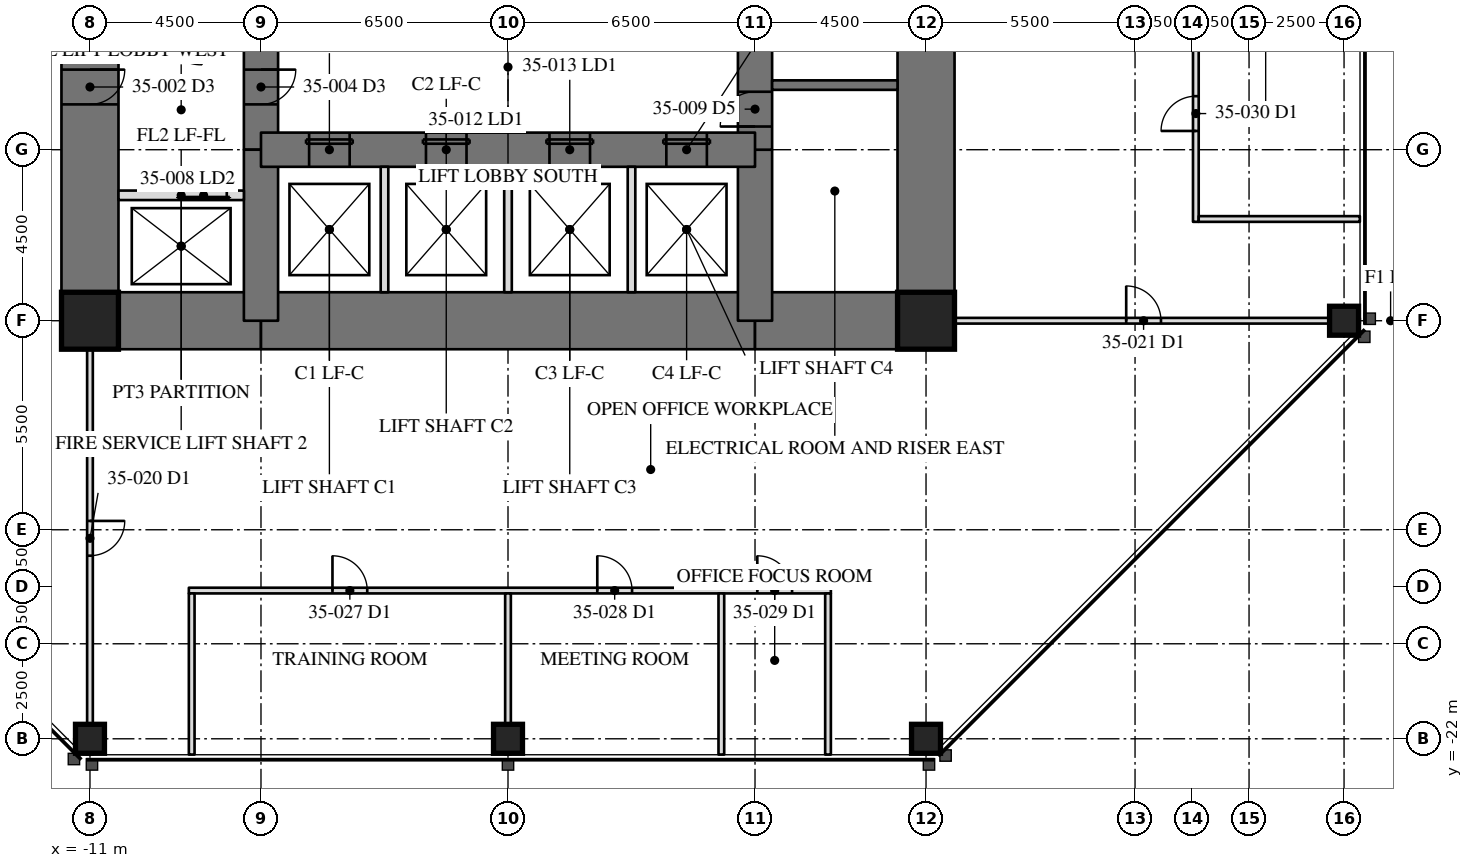
"""IFC4 building model, lengths in metres.
Left out: names, types, materials, properties, quantities, classifications, styles, units other than length and angle.
Written with IfcOpenShell. Run it as: python <this file> out.ifc"""

import sys

from ifc_helpers import new_model, si_unit, direction, frame, frame_2d, origin, origin_2d, place, context, subcontext, project, spatial, rectangle, hollow_rectangle, extrude, element, fill, save


model = new_model("IFC4")
c1 = context("Model", 3, precision=1e-05, world=origin(), true_north=direction((0.0, 1.0)))
c2 = subcontext(c1, "Body", "Model", "MODEL_VIEW")
j1 = project(units=[si_unit("LENGTHUNIT", "METRE"), si_unit("PLANEANGLEUNIT", "RADIAN")], contexts=[c1])
p1 = place(None, origin())
s1 = spatial("IfcSite", under=j1, at=p1, CompositionType="ELEMENT")
p2 = place(p1, origin())
s2 = spatial("IfcBuilding", under=s1, at=p2, CompositionType="ELEMENT")
p3 = place(p2, frame((0.0, 0.0, 150.0)))
s3 = spatial("IfcBuildingStorey", under=s2, at=p3, CompositionType="ELEMENT", Elevation=150.0)
for number, where, z_axis, x_axis in (
    (1, (-11.0, -22.0, 0.0), (0.0, 0.0, 1.0), (1.0, 0.0, 0.0)),
    (2, (0.0, -22.0, 0.0), (0.0, 0.0, 1.0), (1.0, 0.0, 0.0)),
    (3, (11.0, -22.0, 0.0), (0.0, 0.0, 1.0), (1.0, 0.0, 0.0)),
    (4, (22.0, -11.0, 0.0), (0.0, 0.0, 1.0), (0.0, 1.0, 0.0)),
):
    element("IfcColumn", number, at=place(p3, frame(where, z_axis=z_axis, x_axis=x_axis)), inside=s3, PredefinedType="COLUMN", context=c2, shape_type="SweptSolid", body=[
        extrude(hollow_rectangle(XDim=0.762, YDim=0.762, WallThickness=0.076, at=origin_2d()), origin(), (0.0, 0.0, 1.0), 4.1),
    ])
p4 = place(p3, frame((11.0, -11.0, 0.0), z_axis=(0.0, 0.0, 1.0), x_axis=(0.0, 1.0, 0.0)))
e5 = element("IfcWall", 5, at=p4, inside=s3, PredefinedType="SHEAR", context=c2, shape_type="SweptSolid", body=[
    extrude(rectangle(XDim=22.0, YDim=1.5, at=frame_2d((11.0, 0.0))), origin(), (0.0, 0.0, 1.0), 4.1),
])
p5 = place(p4, frame((15.393, 0.0, 0.0)))
e6 = element("IfcOpeningElement", 6, at=p5, cuts=e5, PredefinedType="OPENING", context=c2, shape_type="SweptSolid", body=[
    extrude(rectangle(XDim=0.915, YDim=2.134, at=frame_2d((0.458, 1.067))), frame((0.0, 0.76, 0.0), z_axis=(0.0, -1.0, 0.0), x_axis=(1.0, 0.0, 0.0)), (0.0, 0.0, 1.0), 1.52),
])
p6 = place(p3, frame((-11.0, 11.0, 0.0), z_axis=(0.0, 0.0, 1.0), x_axis=(0.0, -1.0, 0.0)))
e7 = element("IfcWall", 7, at=p6, inside=s3, PredefinedType="SHEAR", context=c2, shape_type="SweptSolid", body=[
    extrude(rectangle(XDim=22.0, YDim=1.5, at=frame_2d((11.0, 0.0))), origin(), (0.0, 0.0, 1.0), 4.1),
])
p7 = place(p6, frame((15.393, 0.0, 0.0)))
e8 = element("IfcOpeningElement", 8, at=p7, cuts=e7, PredefinedType="OPENING", context=c2, shape_type="SweptSolid", body=[
    extrude(rectangle(XDim=0.915, YDim=2.134, at=frame_2d((0.458, 1.067))), frame((0.0, 0.76, 0.0), z_axis=(0.0, -1.0, 0.0), x_axis=(1.0, 0.0, 0.0)), (0.0, 0.0, 1.0), 1.52),
])
p8 = place(p3, frame((-11.0, -11.0, 0.0), z_axis=(0.0, 0.0, 1.0), x_axis=(1.0, 0.0, 0.0)))
e9 = element("IfcWall", 9, at=p8, inside=s3, PredefinedType="SHEAR", context=c2, shape_type="SweptSolid", body=[
    extrude(rectangle(XDim=4.5, YDim=1.5, at=frame_2d((2.25, 0.0))), origin(), (0.0, 0.0, 1.0), 4.1),
])
p9 = place(p3, frame((-6.5, -11.0, 0.0), z_axis=(0.0, 0.0, 1.0), x_axis=(1.0, 0.0, 0.0)))
e10 = element("IfcWall", 10, at=p9, inside=s3, PredefinedType="SHEAR", context=c2, shape_type="SweptSolid", body=[
    extrude(rectangle(XDim=13.0, YDim=1.5, at=frame_2d((6.5, 0.0))), origin(), (0.0, 0.0, 1.0), 4.1),
])
p10 = place(p3, frame((6.5, -11.0, 0.0), z_axis=(0.0, 0.0, 1.0), x_axis=(1.0, 0.0, 0.0)))
e11 = element("IfcWall", 11, at=p10, inside=s3, PredefinedType="SHEAR", context=c2, shape_type="SweptSolid", body=[
    extrude(rectangle(XDim=4.5, YDim=1.5, at=frame_2d((2.25, 0.0))), origin(), (0.0, 0.0, 1.0), 4.1),
])
p11 = place(p3, frame((6.5, -11.0, 0.0), z_axis=(0.0, 0.0, 1.0), x_axis=(0.0, 1.0, 0.0)))
e12 = element("IfcWall", 12, at=p11, inside=s3, PredefinedType="SHEAR", context=c2, shape_type="SweptSolid", body=[
    extrude(rectangle(XDim=4.5, YDim=0.9, at=frame_2d((2.25, 0.0))), origin(), (0.0, 0.0, 1.0), 4.1),
])
p12 = place(p3, frame((6.5, -6.5, 0.0), z_axis=(0.0, 0.0, 1.0), x_axis=(0.0, 1.0, 0.0)))
e13 = element("IfcWall", 13, at=p12, inside=s3, PredefinedType="SHEAR", context=c2, shape_type="SweptSolid", body=[
    extrude(rectangle(XDim=13.0, YDim=0.9, at=frame_2d((6.5, 0.0))), origin(), (0.0, 0.0, 1.0), 4.1),
])
p13 = place(p12, frame((10.893, 0.0, 0.0)))
e14 = element("IfcOpeningElement", 14, at=p13, cuts=e13, PredefinedType="OPENING", context=c2, shape_type="SweptSolid", body=[
    extrude(rectangle(XDim=0.915, YDim=2.134, at=frame_2d((0.458, 1.067))), frame((0.0, 0.46, 0.0), z_axis=(0.0, -1.0, 0.0), x_axis=(1.0, 0.0, 0.0)), (0.0, 0.0, 1.0), 0.92),
])
p14 = place(p12, frame((0.61, 0.0, 0.0)))
e15 = element("IfcOpeningElement", 15, at=p14, cuts=e13, PredefinedType="OPENING", context=c2, shape_type="SweptSolid", body=[
    extrude(rectangle(XDim=0.915, YDim=2.134, at=frame_2d((0.458, 1.067))), frame((0.0, 0.46, 0.0), z_axis=(0.0, -1.0, 0.0), x_axis=(1.0, 0.0, 0.0)), (0.0, 0.0, 1.0), 0.92),
])
p15 = place(p3, frame((-6.5, 6.5, 0.0), z_axis=(0.0, 0.0, 1.0), x_axis=(0.0, -1.0, 0.0)))
e16 = element("IfcWall", 16, at=p15, inside=s3, PredefinedType="SHEAR", context=c2, shape_type="SweptSolid", body=[
    extrude(rectangle(XDim=13.0, YDim=0.9, at=frame_2d((6.5, 0.0))), origin(), (0.0, 0.0, 1.0), 4.1),
])
p16 = place(p15, frame((10.893, 0.0, 0.0)))
e17 = element("IfcOpeningElement", 17, at=p16, cuts=e16, PredefinedType="OPENING", context=c2, shape_type="SweptSolid", body=[
    extrude(rectangle(XDim=0.915, YDim=2.134, at=frame_2d((0.458, 1.067))), frame((0.0, 0.46, 0.0), z_axis=(0.0, -1.0, 0.0), x_axis=(1.0, 0.0, 0.0)), (0.0, 0.0, 1.0), 0.92),
])
p17 = place(p15, frame((0.61, 0.0, 0.0)))
e18 = element("IfcOpeningElement", 18, at=p17, cuts=e16, PredefinedType="OPENING", context=c2, shape_type="SweptSolid", body=[
    extrude(rectangle(XDim=0.915, YDim=2.134, at=frame_2d((0.458, 1.067))), frame((0.0, 0.46, 0.0), z_axis=(0.0, -1.0, 0.0), x_axis=(1.0, 0.0, 0.0)), (0.0, 0.0, 1.0), 0.92),
])
p18 = place(p3, frame((-6.5, -6.5, 0.0), z_axis=(0.0, 0.0, 1.0), x_axis=(0.0, -1.0, 0.0)))
e19 = element("IfcWall", 19, at=p18, inside=s3, PredefinedType="SHEAR", context=c2, shape_type="SweptSolid", body=[
    extrude(rectangle(XDim=4.5, YDim=0.9, at=frame_2d((2.25, 0.0))), origin(), (0.0, 0.0, 1.0), 4.1),
])
p19 = place(p3, frame((-6.5, -6.5, 0.0), z_axis=(0.0, 0.0, 1.0), x_axis=(1.0, 0.0, 0.0)))
e20 = element("IfcWall", 20, at=p19, inside=s3, PredefinedType="SHEAR", context=c2, shape_type="SweptSolid", body=[
    extrude(rectangle(XDim=13.0, YDim=0.9, at=frame_2d((6.5, 0.0))), origin(), (0.0, 0.0, 1.0), 4.1),
])
p20 = place(p19, frame((1.267, 0.0, 0.0)))
e21 = element("IfcOpeningElement", 21, at=p20, cuts=e20, PredefinedType="OPENING", context=c2, shape_type="SweptSolid", body=[
    extrude(rectangle(XDim=1.067, YDim=2.134, at=frame_2d((0.533, 1.067))), frame((0.0, 0.46, 0.0), z_axis=(0.0, -1.0, 0.0), x_axis=(1.0, 0.0, 0.0)), (0.0, 0.0, 1.0), 0.92),
])
p21 = place(p19, frame((4.342, 0.0, 0.0)))
e22 = element("IfcOpeningElement", 22, at=p21, cuts=e20, PredefinedType="OPENING", context=c2, shape_type="SweptSolid", body=[
    extrude(rectangle(XDim=1.067, YDim=2.134, at=frame_2d((0.533, 1.067))), frame((0.0, 0.46, 0.0), z_axis=(0.0, -1.0, 0.0), x_axis=(1.0, 0.0, 0.0)), (0.0, 0.0, 1.0), 0.92),
])
p22 = place(p19, frame((7.592, 0.0, 0.0)))
e23 = element("IfcOpeningElement", 23, at=p22, cuts=e20, PredefinedType="OPENING", context=c2, shape_type="SweptSolid", body=[
    extrude(rectangle(XDim=1.067, YDim=2.134, at=frame_2d((0.533, 1.067))), frame((0.0, 0.46, 0.0), z_axis=(0.0, -1.0, 0.0), x_axis=(1.0, 0.0, 0.0)), (0.0, 0.0, 1.0), 0.92),
])
p23 = place(p19, frame((10.667, 0.0, 0.0)))
e24 = element("IfcOpeningElement", 24, at=p23, cuts=e20, PredefinedType="OPENING", context=c2, shape_type="SweptSolid", body=[
    extrude(rectangle(XDim=1.067, YDim=2.134, at=frame_2d((0.533, 1.067))), frame((0.0, 0.46, 0.0), z_axis=(0.0, -1.0, 0.0), x_axis=(1.0, 0.0, 0.0)), (0.0, 0.0, 1.0), 0.92),
])
for number, where, z_axis, x_axis in (
    (25, (-11.0, -11.0, 0.0), (0.0, 0.0, 1.0), (1.0, 0.0, 0.0)),
    (26, (11.0, -11.0, 0.0), (0.0, 0.0, 1.0), (1.0, 0.0, 0.0)),
):
    element("IfcColumn", number, at=place(p3, frame(where, z_axis=z_axis, x_axis=x_axis)), inside=s3, PredefinedType="COLUMN", context=c2, shape_type="SweptSolid", body=[
        extrude(hollow_rectangle(XDim=1.499, YDim=1.499, WallThickness=0.102, at=origin_2d()), origin(), (0.0, 0.0, 1.0), 4.1),
    ])
p24 = place(p3, frame((6.95, -4.8, 0.0), z_axis=(0.0, 0.0, 1.0), x_axis=(1.0, 0.0, 0.0)))
e27 = element("IfcWall", 27, at=p24, inside=s3, PredefinedType="SOLIDWALL", context=c2, shape_type="SweptSolid", body=[
    extrude(rectangle(XDim=3.3, YDim=0.25, at=frame_2d((1.65, 0.0))), origin(), (0.0, 0.0, 1.0), 3.91),
])
p25 = place(p3, frame((-6.95, -7.7, 0.0), z_axis=(0.0, 0.0, 1.0), x_axis=(-1.0, 0.0, 0.0)))
e28 = element("IfcWall", 28, at=p25, inside=s3, PredefinedType="PARTITIONING", context=c2, shape_type="SweptSolid", body=[
    extrude(rectangle(XDim=3.3, YDim=0.25, at=frame_2d((1.65, 0.0))), origin(), (0.0, 0.0, 1.0), 3.91),
])
p26 = place(p25, frame((0.45, 0.0, 0.0)))
e29 = element("IfcOpeningElement", 29, at=p26, cuts=e28, PredefinedType="OPENING", context=c2, shape_type="SweptSolid", body=[
    extrude(rectangle(XDim=1.219, YDim=2.134, at=frame_2d((0.609, 1.067))), frame((0.0, 0.135, 0.0), z_axis=(0.0, -1.0, 0.0), x_axis=(1.0, 0.0, 0.0)), (0.0, 0.0, 1.0), 0.27),
])
for number, where, z_axis, x_axis in (
    (30, (-3.25, -10.25, 0.0), (0.0, 0.0, 1.0), (0.0, 1.0, 0.0)),
    (31, (0.0, -10.25, 0.0), (0.0, 0.0, 1.0), (0.0, 1.0, 0.0)),
    (32, (3.25, -10.25, 0.0), (0.0, 0.0, 1.0), (0.0, 1.0, 0.0)),
):
    element("IfcWall", number, at=place(p3, frame(where, z_axis=z_axis, x_axis=x_axis)), inside=s3, PredefinedType="PARTITIONING", context=c2, shape_type="SweptSolid", body=[
        extrude(rectangle(XDim=3.3, YDim=0.2, at=frame_2d((1.65, 0.0))), origin(), (0.0, 0.0, 1.0), 3.91),
    ])
p27 = place(p3, frame((-11.0, -11.75, 0.0), z_axis=(0.0, 0.0, 1.0), x_axis=(0.0, -1.0, 0.0)))
e33 = element("IfcWall", 33, at=p27, inside=s3, PredefinedType="PARTITIONING", context=c2, shape_type="SweptSolid", body=[
    extrude(rectangle(XDim=10.665, YDim=0.15, at=frame_2d((5.333, 0.0))), origin(), (0.0, 0.0, 1.0), 3.326),
])
p28 = place(p27, frame((4.518, 0.0, 0.0)))
e34 = element("IfcOpeningElement", 34, at=p28, cuts=e33, PredefinedType="OPENING", context=c2, shape_type="SweptSolid", body=[
    extrude(rectangle(XDim=0.915, YDim=2.134, at=frame_2d((0.458, 1.067))), frame((0.0, 0.085, 0.0), z_axis=(0.0, -1.0, 0.0), x_axis=(1.0, 0.0, 0.0)), (0.0, 0.0, 1.0), 0.17),
])
p29 = place(p3, frame((11.75, -11.0, 0.0), z_axis=(0.0, 0.0, 1.0), x_axis=(1.0, 0.0, 0.0)))
e35 = element("IfcWall", 35, at=p29, inside=s3, PredefinedType="PARTITIONING", context=c2, shape_type="SweptSolid", body=[
    extrude(rectangle(XDim=10.665, YDim=0.15, at=frame_2d((5.333, 0.0))), origin(), (0.0, 0.0, 1.0), 3.326),
])
p30 = place(p29, frame((4.518, 0.0, 0.0)))
e36 = element("IfcOpeningElement", 36, at=p30, cuts=e35, PredefinedType="OPENING", context=c2, shape_type="SweptSolid", body=[
    extrude(rectangle(XDim=0.915, YDim=2.134, at=frame_2d((0.458, 1.067))), frame((0.0, 0.085, 0.0), z_axis=(0.0, -1.0, 0.0), x_axis=(1.0, 0.0, 0.0)), (0.0, 0.0, 1.0), 0.17),
])
p31 = place(p3, frame((-8.398, -18.1, 0.0), z_axis=(0.0, 0.0, 1.0), x_axis=(1.0, 0.0, 0.0)))
e37 = element("IfcWall", 37, at=p31, inside=s3, PredefinedType="PARTITIONING", context=c2, shape_type="SweptSolid", body=[
    extrude(rectangle(XDim=16.894, YDim=0.15, at=frame_2d((8.447, 0.0))), origin(), (0.0, 0.0, 1.0), 3.91),
])
p32 = place(p31, frame((3.779, 0.0, 0.0)))
e38 = element("IfcOpeningElement", 38, at=p32, cuts=e37, PredefinedType="OPENING", context=c2, shape_type="SweptSolid", body=[
    extrude(rectangle(XDim=0.915, YDim=2.134, at=frame_2d((0.458, 1.067))), frame((0.0, 0.085, 0.0), z_axis=(0.0, -1.0, 0.0), x_axis=(1.0, 0.0, 0.0)), (0.0, 0.0, 1.0), 0.17),
])
p33 = place(p31, frame((10.748, 0.0, 0.0)))
e39 = element("IfcOpeningElement", 39, at=p33, cuts=e37, PredefinedType="OPENING", context=c2, shape_type="SweptSolid", body=[
    extrude(rectangle(XDim=0.915, YDim=2.134, at=frame_2d((0.458, 1.067))), frame((0.0, 0.085, 0.0), z_axis=(0.0, -1.0, 0.0), x_axis=(1.0, 0.0, 0.0)), (0.0, 0.0, 1.0), 0.17),
])
p34 = place(p31, frame((14.958, 0.0, 0.0)))
e40 = element("IfcOpeningElement", 40, at=p34, cuts=e37, PredefinedType="OPENING", context=c2, shape_type="SweptSolid", body=[
    extrude(rectangle(XDim=0.915, YDim=2.134, at=frame_2d((0.458, 1.067))), frame((0.0, 0.085, 0.0), z_axis=(0.0, -1.0, 0.0), x_axis=(1.0, 0.0, 0.0)), (0.0, 0.0, 1.0), 0.17),
])
p35 = place(p3, frame((-8.323, -18.175, 0.0), z_axis=(0.0, 0.0, 1.0), x_axis=(0.0, -1.0, 0.0)))
e41 = element("IfcWall", 41, at=p35, inside=s3, PredefinedType="PARTITIONING", context=c2, shape_type="SweptSolid", body=[
    extrude(rectangle(XDim=4.24, YDim=0.15, at=frame_2d((2.12, 0.0))), origin(), (0.0, 0.0, 1.0), 3.91),
])
p36 = place(p3, frame((0.0, -18.175, 0.0), z_axis=(0.0, 0.0, 1.0), x_axis=(0.0, -1.0, 0.0)))
e42 = element("IfcWall", 42, at=p36, inside=s3, PredefinedType="PARTITIONING", context=c2, shape_type="SweptSolid", body=[
    extrude(rectangle(XDim=4.24, YDim=0.15, at=frame_2d((2.12, 0.0))), origin(), (0.0, 0.0, 1.0), 3.326),
])
for number, where, z_axis, x_axis in (
    (43, (5.614, -18.175, 0.0), (0.0, 0.0, 1.0), (0.0, -1.0, 0.0)),
    (44, (8.421, -18.175, 0.0), (0.0, 0.0, 1.0), (0.0, -1.0, 0.0)),
):
    element("IfcWall", number, at=place(p3, frame(where, z_axis=z_axis, x_axis=x_axis)), inside=s3, PredefinedType="PARTITIONING", context=c2, shape_type="SweptSolid", body=[
        extrude(rectangle(XDim=4.24, YDim=0.15, at=frame_2d((2.12, 0.0))), origin(), (0.0, 0.0, 1.0), 3.91),
    ])
p37 = place(p3, frame((18.1, -8.398, 0.0), z_axis=(0.0, 0.0, 1.0), x_axis=(0.0, 1.0, 0.0)))
e45 = element("IfcWall", 45, at=p37, inside=s3, PredefinedType="PARTITIONING", context=c2, shape_type="SweptSolid", body=[
    extrude(rectangle(XDim=16.894, YDim=0.15, at=frame_2d((8.447, 0.0))), origin(), (0.0, 0.0, 1.0), 3.91),
])
p38 = place(p37, frame((2.392, 0.0, 0.0)))
e46 = element("IfcOpeningElement", 46, at=p38, cuts=e45, PredefinedType="OPENING", context=c2, shape_type="SweptSolid", body=[
    extrude(rectangle(XDim=0.915, YDim=2.134, at=frame_2d((0.458, 1.067))), frame((0.0, 0.085, 0.0), z_axis=(0.0, -1.0, 0.0), x_axis=(1.0, 0.0, 0.0)), (0.0, 0.0, 1.0), 0.17),
])
p39 = place(p37, frame((6.553, 0.0, 0.0)))
e47 = element("IfcOpeningElement", 47, at=p39, cuts=e45, PredefinedType="OPENING", context=c2, shape_type="SweptSolid", body=[
    extrude(rectangle(XDim=0.915, YDim=2.134, at=frame_2d((0.458, 1.067))), frame((0.0, 0.085, 0.0), z_axis=(0.0, -1.0, 0.0), x_axis=(1.0, 0.0, 0.0)), (0.0, 0.0, 1.0), 0.17),
])
p40 = place(p37, frame((9.344, 0.0, 0.0)))
e48 = element("IfcOpeningElement", 48, at=p40, cuts=e45, PredefinedType="OPENING", context=c2, shape_type="SweptSolid", body=[
    extrude(rectangle(XDim=0.915, YDim=2.134, at=frame_2d((0.458, 1.067))), frame((0.0, 0.085, 0.0), z_axis=(0.0, -1.0, 0.0), x_axis=(1.0, 0.0, 0.0)), (0.0, 0.0, 1.0), 0.17),
])
p41 = place(p37, frame((13.554, 0.0, 0.0)))
e49 = element("IfcOpeningElement", 49, at=p41, cuts=e45, PredefinedType="OPENING", context=c2, shape_type="SweptSolid", body=[
    extrude(rectangle(XDim=0.915, YDim=2.134, at=frame_2d((0.458, 1.067))), frame((0.0, 0.085, 0.0), z_axis=(0.0, -1.0, 0.0), x_axis=(1.0, 0.0, 0.0)), (0.0, 0.0, 1.0), 0.17),
])
p42 = place(p3, frame((18.175, -8.323, 0.0), z_axis=(0.0, 0.0, 1.0), x_axis=(1.0, 0.0, 0.0)))
e50 = element("IfcWall", 50, at=p42, inside=s3, PredefinedType="PARTITIONING", context=c2, shape_type="SweptSolid", body=[
    extrude(rectangle(XDim=4.24, YDim=0.15, at=frame_2d((2.12, 0.0))), origin(), (0.0, 0.0, 1.0), 3.91),
])
p43 = place(p7, origin())
e51 = element("IfcDoor", 51, at=p43, inside=s3, OperationType="SINGLE_SWING_RIGHT", PredefinedType="DOOR", context=c2, shape_type="SweptSolid", body=[
    extrude(rectangle(XDim=0.915, YDim=2.134, at=frame_2d((0.458, 1.067))), frame((0.0, -0.675, 0.0), z_axis=(0.0, -1.0, 0.0), x_axis=(1.0, 0.0, 0.0)), (0.0, 0.0, 1.0), 0.05),
])
fill(e8, e51)
p44 = place(p16, origin())
e52 = element("IfcDoor", 52, at=p44, inside=s3, OperationType="SINGLE_SWING_RIGHT", PredefinedType="DOOR", context=c2, shape_type="SweptSolid", body=[
    extrude(rectangle(XDim=0.915, YDim=2.134, at=frame_2d((0.458, 1.067))), frame((0.0, -0.375, 0.0), z_axis=(0.0, -1.0, 0.0), x_axis=(1.0, 0.0, 0.0)), (0.0, 0.0, 1.0), 0.05),
])
fill(e17, e52)
p45 = place(p26, origin())
e53 = element("IfcDoor", 53, at=p45, inside=s3, OperationType="SLIDING_TO_LEFT", PredefinedType="DOOR", context=c2, shape_type="SweptSolid", body=[
    extrude(rectangle(XDim=1.219, YDim=2.134, at=frame_2d((0.609, 1.067))), frame((0.0, 0.025, 0.0), z_axis=(0.0, -1.0, 0.0), x_axis=(1.0, 0.0, 0.0)), (0.0, 0.0, 1.0), 0.05),
])
fill(e29, e53)
p46 = place(p14, origin())
e54 = element("IfcDoor", 54, at=p46, inside=s3, OperationType="SINGLE_SWING_RIGHT", PredefinedType="DOOR", context=c2, shape_type="SweptSolid", body=[
    extrude(rectangle(XDim=0.915, YDim=2.134, at=frame_2d((0.458, 1.067))), frame((0.0, -0.375, 0.0), z_axis=(0.0, -1.0, 0.0), x_axis=(1.0, 0.0, 0.0)), (0.0, 0.0, 1.0), 0.05),
])
fill(e15, e54)
p47 = place(p20, origin())
e55 = element("IfcDoor", 55, at=p47, inside=s3, OperationType="SLIDING_TO_LEFT", PredefinedType="DOOR", context=c2, shape_type="SweptSolid", body=[
    extrude(rectangle(XDim=1.067, YDim=2.134, at=frame_2d((0.533, 1.067))), frame((0.0, -0.375, 0.0), z_axis=(0.0, -1.0, 0.0), x_axis=(1.0, 0.0, 0.0)), (0.0, 0.0, 1.0), 0.05),
])
fill(e21, e55)
p48 = place(p21, origin())
e56 = element("IfcDoor", 56, at=p48, inside=s3, OperationType="SLIDING_TO_LEFT", PredefinedType="DOOR", context=c2, shape_type="SweptSolid", body=[
    extrude(rectangle(XDim=1.067, YDim=2.134, at=frame_2d((0.533, 1.067))), frame((0.0, -0.375, 0.0), z_axis=(0.0, -1.0, 0.0), x_axis=(1.0, 0.0, 0.0)), (0.0, 0.0, 1.0), 0.05),
])
fill(e22, e56)
p49 = place(p22, origin())
e57 = element("IfcDoor", 57, at=p49, inside=s3, OperationType="SLIDING_TO_LEFT", PredefinedType="DOOR", context=c2, shape_type="SweptSolid", body=[
    extrude(rectangle(XDim=1.067, YDim=2.134, at=frame_2d((0.533, 1.067))), frame((0.0, -0.375, 0.0), z_axis=(0.0, -1.0, 0.0), x_axis=(1.0, 0.0, 0.0)), (0.0, 0.0, 1.0), 0.05),
])
fill(e23, e57)
p50 = place(p23, origin())
e58 = element("IfcDoor", 58, at=p50, inside=s3, OperationType="SLIDING_TO_LEFT", PredefinedType="DOOR", context=c2, shape_type="SweptSolid", body=[
    extrude(rectangle(XDim=1.067, YDim=2.134, at=frame_2d((0.533, 1.067))), frame((0.0, -0.375, 0.0), z_axis=(0.0, -1.0, 0.0), x_axis=(1.0, 0.0, 0.0)), (0.0, 0.0, 1.0), 0.05),
])
fill(e24, e58)
p51 = place(p28, origin())
e59 = element("IfcDoor", 59, at=p51, inside=s3, OperationType="SINGLE_SWING_LEFT", PredefinedType="DOOR", context=c2, shape_type="SweptSolid", body=[
    extrude(rectangle(XDim=0.915, YDim=2.134, at=frame_2d((0.458, 1.067))), frame((0.0, 0.025, 0.0), z_axis=(0.0, -1.0, 0.0), x_axis=(1.0, 0.0, 0.0)), (0.0, 0.0, 1.0), 0.05),
])
fill(e34, e59)
p52 = place(p30, origin())
e60 = element("IfcDoor", 60, at=p52, inside=s3, OperationType="SINGLE_SWING_LEFT", PredefinedType="DOOR", context=c2, shape_type="SweptSolid", body=[
    extrude(rectangle(XDim=0.915, YDim=2.134, at=frame_2d((0.458, 1.067))), frame((0.0, 0.025, 0.0), z_axis=(0.0, -1.0, 0.0), x_axis=(1.0, 0.0, 0.0)), (0.0, 0.0, 1.0), 0.05),
])
fill(e36, e60)
p53 = place(p32, origin())
e61 = element("IfcDoor", 61, at=p53, inside=s3, OperationType="SINGLE_SWING_LEFT", PredefinedType="DOOR", context=c2, shape_type="SweptSolid", body=[
    extrude(rectangle(XDim=0.915, YDim=2.134, at=frame_2d((0.458, 1.067))), frame((0.0, 0.025, 0.0), z_axis=(0.0, -1.0, 0.0), x_axis=(1.0, 0.0, 0.0)), (0.0, 0.0, 1.0), 0.05),
])
fill(e38, e61)
p54 = place(p33, origin())
e62 = element("IfcDoor", 62, at=p54, inside=s3, OperationType="SINGLE_SWING_LEFT", PredefinedType="DOOR", context=c2, shape_type="SweptSolid", body=[
    extrude(rectangle(XDim=0.915, YDim=2.134, at=frame_2d((0.458, 1.067))), frame((0.0, 0.025, 0.0), z_axis=(0.0, -1.0, 0.0), x_axis=(1.0, 0.0, 0.0)), (0.0, 0.0, 1.0), 0.05),
])
fill(e39, e62)
p55 = place(p34, origin())
e63 = element("IfcDoor", 63, at=p55, inside=s3, OperationType="SINGLE_SWING_LEFT", PredefinedType="DOOR", context=c2, shape_type="SweptSolid", body=[
    extrude(rectangle(XDim=0.915, YDim=2.134, at=frame_2d((0.458, 1.067))), frame((0.0, 0.025, 0.0), z_axis=(0.0, -1.0, 0.0), x_axis=(1.0, 0.0, 0.0)), (0.0, 0.0, 1.0), 0.05),
])
fill(e40, e63)
p56 = place(p38, origin())
e64 = element("IfcDoor", 64, at=p56, inside=s3, OperationType="SINGLE_SWING_LEFT", PredefinedType="DOOR", context=c2, shape_type="SweptSolid", body=[
    extrude(rectangle(XDim=0.915, YDim=2.134, at=frame_2d((0.458, 1.067))), frame((0.0, 0.025, 0.0), z_axis=(0.0, -1.0, 0.0), x_axis=(1.0, 0.0, 0.0)), (0.0, 0.0, 1.0), 0.05),
])
fill(e46, e64)
save(model, sys.argv[1])
